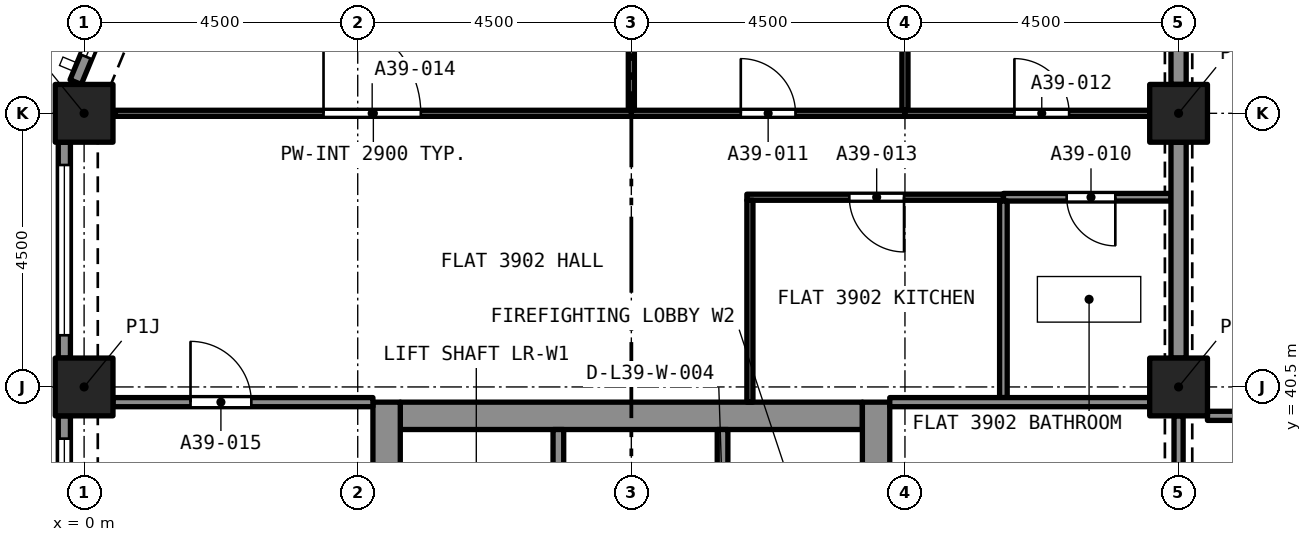
"""IFC4 building model, lengths in metres.
Left out: names, types, materials, properties, quantities, classifications, styles, units other than length and angle.
Written with IfcOpenShell. Run it as: python <this file> out.ifc"""

import sys

from ifc_helpers import new_model, si_unit, direction, frame, frame_2d, origin, origin_2d, place, context, subcontext, project, spatial, rectangle, extrude, element, fill, save


model = new_model("IFC4")
c1 = context("Model", 3, precision=1e-05, world=origin(), true_north=direction((0.0, 1.0)))
c2 = subcontext(c1, "Body", "Model", "MODEL_VIEW")
j1 = project(units=[si_unit("LENGTHUNIT", "METRE"), si_unit("PLANEANGLEUNIT", "RADIAN")], contexts=[c1])
p1 = place(None, origin())
s1 = spatial("IfcSite", under=j1, at=p1, CompositionType="ELEMENT")
p2 = place(p1, origin())
s2 = spatial("IfcBuilding", under=s1, at=p2, CompositionType="ELEMENT")
p3 = place(p2, frame((0.0, 0.0, 139.8)))
s3 = spatial("IfcBuildingStorey", under=s2, at=p3, CompositionType="ELEMENT", Elevation=139.8)
for number, where, z_axis, x_axis in (
    (1, (0.0, 40.5, 0.0), (0.0, 0.0, 1.0), (1.0, 0.0, 0.0)),
    (2, (18.0, 40.5, 0.0), (0.0, 0.0, 1.0), (1.0, 0.0, 0.0)),
    (3, (0.0, 45.0, 0.0), (0.0, 0.0, 1.0), (1.0, 0.0, 0.0)),
    (4, (18.0, 45.0, 0.0), (0.0, 0.0, 1.0), (1.0, 0.0, 0.0)),
):
    element("IfcColumn", number, at=place(p3, frame(where, z_axis=z_axis, x_axis=x_axis)), inside=s3, PredefinedType="COLUMN", context=c2, shape_type="SweptSolid", body=[
        extrude(rectangle(XDim=0.95, YDim=0.95, at=origin_2d()), origin(), (0.0, 0.0, 1.0), 3.2),
    ])
p4 = place(p3, frame((5.2, 40.025, 0.0), z_axis=(0.0, 0.0, 1.0), x_axis=(1.0, 0.0, 0.0)))
e5 = element("IfcWall", 5, at=p4, inside=s3, PredefinedType="SOLIDWALL", context=c2, shape_type="SweptSolid", body=[
    extrude(rectangle(XDim=7.6, YDim=0.45, at=frame_2d((3.8, 0.0))), origin(), (0.0, 0.0, 1.0), 3.2),
])
p5 = place(p3, frame((4.975, 27.25, 0.0), z_axis=(0.0, 0.0, 1.0), x_axis=(0.0, 1.0, 0.0)))
e6 = element("IfcWall", 6, at=p5, inside=s3, PredefinedType="SOLIDWALL", context=c2, shape_type="SweptSolid", body=[
    extrude(rectangle(XDim=13.0, YDim=0.45, at=frame_2d((6.5, 0.0))), origin(), (0.0, 0.0, 1.0), 3.2),
])
p6 = place(p5, frame((8.7, 0.0, 0.0)))
e7 = element("IfcOpeningElement", 7, at=p6, cuts=e6, PredefinedType="OPENING", context=c2, shape_type="SweptSolid", body=[
    extrude(rectangle(XDim=1.2, YDim=2.1, at=frame_2d((0.6, 1.05))), frame((0.0, 0.235, 0.0), z_axis=(0.0, -1.0, 0.0), x_axis=(1.0, 0.0, 0.0)), (0.0, 0.0, 1.0), 0.47),
])
p7 = place(p3, frame((13.025, 27.25, 0.0), z_axis=(0.0, 0.0, 1.0), x_axis=(0.0, 1.0, 0.0)))
e8 = element("IfcWall", 8, at=p7, inside=s3, PredefinedType="SOLIDWALL", context=c2, shape_type="SweptSolid", body=[
    extrude(rectangle(XDim=13.0, YDim=0.45, at=frame_2d((6.5, 0.0))), origin(), (0.0, 0.0, 1.0), 3.2),
])
p8 = place(p7, frame((10.85, 0.0, 0.0)))
e9 = element("IfcOpeningElement", 9, at=p8, cuts=e8, PredefinedType="OPENING", context=c2, shape_type="SweptSolid", body=[
    extrude(rectangle(XDim=1.1, YDim=2.1, at=frame_2d((0.55, 1.05))), frame((0.0, 0.235, 0.0), z_axis=(0.0, -1.0, 0.0), x_axis=(1.0, 0.0, 0.0)), (0.0, 0.0, 1.0), 0.47),
])
p9 = place(p7, frame((8.7, 0.0, 0.0)))
e10 = element("IfcOpeningElement", 10, at=p9, cuts=e8, PredefinedType="OPENING", context=c2, shape_type="SweptSolid", body=[
    extrude(rectangle(XDim=1.2, YDim=2.1, at=frame_2d((0.6, 1.05))), frame((0.0, 0.235, 0.0), z_axis=(0.0, -1.0, 0.0), x_axis=(1.0, 0.0, 0.0)), (0.0, 0.0, 1.0), 0.47),
])
p10 = place(p3, frame((-0.139, 45.513, 0.0), z_axis=(0.0, 0.0, 1.0), x_axis=(0.382680855588, 0.923880599843, 0.0)))
e11 = element("IfcWall", 11, at=p10, inside=s3, PredefinedType="SOLIDWALL", context=c2, shape_type="SweptSolid", body=[
    extrude(rectangle(XDim=2.403, YDim=0.2, at=frame_2d((1.201, 0.0))), origin(), (0.0, 0.0, 1.0), 3.2),
])
p11 = place(p10, frame((0.451, 0.0, 0.45)))
e12 = element("IfcOpeningElement", 12, at=p11, cuts=e11, PredefinedType="OPENING", context=c2, shape_type="SweptSolid", body=[
    extrude(rectangle(XDim=1.7, YDim=1.95, at=frame_2d((0.85, 0.975))), frame((0.0, 0.11, 0.0), z_axis=(0.0, -1.0, 0.0), x_axis=(1.0, 0.0, 0.0)), (0.0, 0.0, 1.0), 0.22),
])
p12 = place(p3, frame((-0.325, 40.975, 0.0), z_axis=(0.0, 0.0, 1.0), x_axis=(0.0, 1.0, 0.0)))
e13 = element("IfcWall", 13, at=p12, inside=s3, PredefinedType="SOLIDWALL", context=c2, shape_type="SweptSolid", body=[
    extrude(rectangle(XDim=3.55, YDim=0.2, at=frame_2d((1.775, 0.0))), origin(), (0.0, 0.0, 1.0), 3.2),
])
p13 = place(p12, frame((0.375, 0.0, 0.45)))
e14 = element("IfcOpeningElement", 14, at=p13, cuts=e13, PredefinedType="OPENING", context=c2, shape_type="SweptSolid", body=[
    extrude(rectangle(XDim=2.8, YDim=1.95, at=frame_2d((1.4, 0.975))), frame((0.0, 0.11, 0.0), z_axis=(0.0, -1.0, 0.0), x_axis=(1.0, 0.0, 0.0)), (0.0, 0.0, 1.0), 0.22),
])
p14 = place(p3, frame((-0.325, 36.475, 0.0), z_axis=(0.0, 0.0, 1.0), x_axis=(0.0, 1.0, 0.0)))
e15 = element("IfcWall", 15, at=p14, inside=s3, PredefinedType="SOLIDWALL", context=c2, shape_type="SweptSolid", body=[
    extrude(rectangle(XDim=3.55, YDim=0.2, at=frame_2d((1.775, 0.0))), origin(), (0.0, 0.0, 1.0), 3.2),
])
p15 = place(p14, frame((0.375, 0.0, 0.45)))
e16 = element("IfcOpeningElement", 16, at=p15, cuts=e15, PredefinedType="OPENING", context=c2, shape_type="SweptSolid", body=[
    extrude(rectangle(XDim=2.8, YDim=1.95, at=frame_2d((1.4, 0.975))), frame((0.0, 0.11, 0.0), z_axis=(0.0, -1.0, 0.0), x_axis=(1.0, 0.0, 0.0)), (0.0, 0.0, 1.0), 0.22),
])
p16 = place(p3, frame((17.875, 43.62, 0.0), z_axis=(0.0, 0.0, 1.0), x_axis=(-1.0, 0.0, 0.0)))
e17 = element("IfcWall", 17, at=p16, inside=s3, PredefinedType="PARTITIONING", context=c2, shape_type="SweptSolid", body=[
    extrude(rectangle(XDim=2.756, YDim=0.125, at=frame_2d((1.378, 0.0))), origin(), (0.0, 0.0, 1.0), 2.9),
])
p17 = place(p16, frame((0.915, 0.0, 0.0)))
e18 = element("IfcOpeningElement", 18, at=p17, cuts=e17, PredefinedType="OPENING", context=c2, shape_type="SweptSolid", body=[
    extrude(rectangle(XDim=0.8, YDim=2.1, at=frame_2d((0.4, 1.05))), frame((0.0, 0.073, 0.0), z_axis=(0.0, -1.0, 0.0), x_axis=(1.0, 0.0, 0.0)), (0.0, 0.0, 1.0), 0.145),
])
p18 = place(p3, frame((15.119, 40.325, 0.0), z_axis=(0.0, 0.0, 1.0), x_axis=(0.0, 1.0, 0.0)))
e19 = element("IfcWall", 19, at=p18, inside=s3, PredefinedType="PARTITIONING", context=c2, shape_type="SweptSolid", body=[
    extrude(rectangle(XDim=3.233, YDim=0.125, at=frame_2d((1.616, 0.0))), origin(), (0.0, 0.0, 1.0), 2.9),
])
p19 = place(p3, frame((18.0, 40.975, 0.0), z_axis=(0.0, 0.0, 1.0), x_axis=(0.0, 1.0, 0.0)))
e20 = element("IfcWall", 20, at=p19, inside=s3, PredefinedType="PARTITIONING", context=c2, shape_type="SweptSolid", body=[
    extrude(rectangle(XDim=3.55, YDim=0.25, at=frame_2d((1.775, 0.0))), origin(), (0.0, 0.0, 1.0), 2.38),
])
p20 = place(p3, frame((13.5, 45.05, 0.0), z_axis=(0.0, 0.0, 1.0), x_axis=(0.0, 1.0, 0.0)))
e21 = element("IfcWall", 21, at=p20, inside=s3, PredefinedType="PARTITIONING", context=c2, shape_type="SweptSolid", body=[
    extrude(rectangle(XDim=3.975, YDim=0.1, at=frame_2d((1.987, 0.0))), origin(), (0.0, 0.0, 1.0), 2.9),
])
p21 = place(p3, frame((9.0, 45.0, 0.0), z_axis=(0.0, 0.0, 1.0), x_axis=(1.0, 0.0, 0.0)))
e22 = element("IfcWall", 22, at=p21, inside=s3, PredefinedType="PARTITIONING", context=c2, shape_type="SweptSolid", body=[
    extrude(rectangle(XDim=4.5, YDim=0.1, at=frame_2d((2.25, 0.0))), origin(), (0.0, 0.0, 1.0), 2.9),
])
p22 = place(p21, frame((1.8, 0.0, 0.0)))
e23 = element("IfcOpeningElement", 23, at=p22, cuts=e22, PredefinedType="OPENING", context=c2, shape_type="SweptSolid", body=[
    extrude(rectangle(XDim=0.9, YDim=2.1, at=frame_2d((0.45, 1.05))), frame((0.0, 0.06, 0.0), z_axis=(0.0, -1.0, 0.0), x_axis=(1.0, 0.0, 0.0)), (0.0, 0.0, 1.0), 0.12),
])
p23 = place(p3, frame((9.0, 45.05, 0.0), z_axis=(0.0, 0.0, 1.0), x_axis=(0.0, 1.0, 0.0)))
e24 = element("IfcWall", 24, at=p23, inside=s3, PredefinedType="PARTITIONING", context=c2, shape_type="SweptSolid", body=[
    extrude(rectangle(XDim=3.975, YDim=0.1, at=frame_2d((1.987, 0.0))), origin(), (0.0, 0.0, 1.0), 2.9),
])
p24 = place(p3, frame((13.5, 45.0, 0.0), z_axis=(0.0, 0.0, 1.0), x_axis=(1.0, 0.0, 0.0)))
e25 = element("IfcWall", 25, at=p24, inside=s3, PredefinedType="PARTITIONING", context=c2, shape_type="SweptSolid", body=[
    extrude(rectangle(XDim=4.025, YDim=0.1, at=frame_2d((2.012, 0.0))), origin(), (0.0, 0.0, 1.0), 2.9),
])
p25 = place(p24, frame((1.8, 0.0, 0.0)))
e26 = element("IfcOpeningElement", 26, at=p25, cuts=e25, PredefinedType="OPENING", context=c2, shape_type="SweptSolid", body=[
    extrude(rectangle(XDim=0.9, YDim=2.1, at=frame_2d((0.45, 1.05))), frame((0.0, 0.06, 0.0), z_axis=(0.0, -1.0, 0.0), x_axis=(1.0, 0.0, 0.0)), (0.0, 0.0, 1.0), 0.12),
])
p26 = place(p3, frame((18.0, 45.475, 0.0), z_axis=(0.0, 0.0, 1.0), x_axis=(0.0, 1.0, 0.0)))
e27 = element("IfcWall", 27, at=p26, inside=s3, PredefinedType="PARTITIONING", context=c2, shape_type="SweptSolid", body=[
    extrude(rectangle(XDim=3.55, YDim=0.25, at=frame_2d((1.775, 0.0))), origin(), (0.0, 0.0, 1.0), 2.38),
])
p27 = place(p3, frame((15.119, 43.62, 0.0), z_axis=(0.0, 0.0, 1.0), x_axis=(-1.0, 0.0, 0.0)))
e28 = element("IfcWall", 28, at=p27, inside=s3, PredefinedType="PARTITIONING", context=c2, shape_type="SweptSolid", body=[
    extrude(rectangle(XDim=4.219, YDim=0.1, at=frame_2d((2.11, 0.0))), origin(), (0.0, 0.0, 1.0), 2.9),
])
p28 = place(p27, frame((1.635, 0.0, 0.0)))
e29 = element("IfcOpeningElement", 29, at=p28, cuts=e28, PredefinedType="OPENING", context=c2, shape_type="SweptSolid", body=[
    extrude(rectangle(XDim=0.9, YDim=2.1, at=frame_2d((0.45, 1.05))), frame((0.0, 0.06, 0.0), z_axis=(0.0, -1.0, 0.0), x_axis=(1.0, 0.0, 0.0)), (0.0, 0.0, 1.0), 0.12),
])
p29 = place(p3, frame((10.95, 40.25, 0.0), z_axis=(0.0, 0.0, 1.0), x_axis=(0.0, 1.0, 0.0)))
e30 = element("IfcWall", 30, at=p29, inside=s3, PredefinedType="PARTITIONING", context=c2, shape_type="SweptSolid", body=[
    extrude(rectangle(XDim=3.32, YDim=0.1, at=frame_2d((1.66, 0.0))), origin(), (0.0, 0.0, 1.0), 2.9),
])
p30 = place(p3, frame((0.514, 45.0, 0.0), z_axis=(0.0, 0.0, 1.0), x_axis=(1.0, 0.0, 0.0)))
e31 = element("IfcWall", 31, at=p30, inside=s3, PredefinedType="PARTITIONING", context=c2, shape_type="SweptSolid", body=[
    extrude(rectangle(XDim=8.486, YDim=0.1, at=frame_2d((4.243, 0.0))), origin(), (0.0, 0.0, 1.0), 2.9),
])
p31 = place(p30, frame((3.423, 0.0, 0.0)))
e32 = element("IfcOpeningElement", 32, at=p31, cuts=e31, PredefinedType="OPENING", context=c2, shape_type="SweptSolid", body=[
    extrude(rectangle(XDim=1.6, YDim=2.1, at=frame_2d((0.8, 1.05))), frame((0.0, 0.06, 0.0), z_axis=(0.0, -1.0, 0.0), x_axis=(1.0, 0.0, 0.0)), (0.0, 0.0, 1.0), 0.12),
])
p32 = place(p3, frame((0.475, 40.25, 0.0), z_axis=(0.0, 0.0, 1.0), x_axis=(1.0, 0.0, 0.0)))
e33 = element("IfcWall", 33, at=p32, inside=s3, PredefinedType="PARTITIONING", context=c2, shape_type="SweptSolid", body=[
    extrude(rectangle(XDim=4.275, YDim=0.15, at=frame_2d((2.137, 0.0))), origin(), (0.0, 0.0, 1.0), 2.9),
])
p33 = place(p32, frame((1.275, 0.0, 0.0)))
e34 = element("IfcOpeningElement", 34, at=p33, cuts=e33, PredefinedType="OPENING", context=c2, shape_type="SweptSolid", body=[
    extrude(rectangle(XDim=1.0, YDim=2.1, at=frame_2d((0.5, 1.05))), frame((0.0, 0.085, 0.0), z_axis=(0.0, -1.0, 0.0), x_axis=(1.0, 0.0, 0.0)), (0.0, 0.0, 1.0), 0.17),
])
p34 = place(p3, frame((13.25, 40.25, 0.0), z_axis=(0.0, 0.0, 1.0), x_axis=(1.0, 0.0, 0.0)))
e35 = element("IfcWall", 35, at=p34, inside=s3, PredefinedType="PARTITIONING", context=c2, shape_type="SweptSolid", body=[
    extrude(rectangle(XDim=4.275, YDim=0.15, at=frame_2d((2.137, 0.0))), origin(), (0.0, 0.0, 1.0), 2.9),
])
p35 = place(p3, frame((18.475, 40.025, 0.0), z_axis=(0.0, 0.0, 1.0), x_axis=(1.0, 0.0, 0.0)))
e36 = element("IfcWall", 36, at=p35, inside=s3, PredefinedType="PARTITIONING", context=c2, shape_type="SweptSolid", body=[
    extrude(rectangle(XDim=12.55, YDim=0.15, at=frame_2d((6.275, 0.0))), origin(), (0.0, 0.0, 1.0), 2.75),
])
p36 = place(p35, frame((5.775, 0.0, 0.0)))
e37 = element("IfcOpeningElement", 37, at=p36, cuts=e36, PredefinedType="OPENING", context=c2, shape_type="SweptSolid", body=[
    extrude(rectangle(XDim=1.0, YDim=2.1, at=frame_2d((0.5, 1.05))), frame((0.0, 0.085, 0.0), z_axis=(0.0, -1.0, 0.0), x_axis=(1.0, 0.0, 0.0)), (0.0, 0.0, 1.0), 0.17),
])
p37 = place(p3, frame((18.0, 40.025, 0.0), z_axis=(0.0, 0.0, 1.0), x_axis=(0.0, -1.0, 0.0)))
e38 = element("IfcWall", 38, at=p37, inside=s3, PredefinedType="PARTITIONING", context=c2, shape_type="SweptSolid", body=[
    extrude(rectangle(XDim=3.55, YDim=0.15, at=frame_2d((1.775, 0.0))), origin(), (0.0, 0.0, 1.0), 2.38),
])
p38 = place(p37, frame((1.175, 0.0, 0.0)))
e39 = element("IfcOpeningElement", 39, at=p38, cuts=e38, PredefinedType="OPENING", context=c2, shape_type="SweptSolid", body=[
    extrude(rectangle(XDim=1.2, YDim=2.1, at=frame_2d((0.6, 1.05))), frame((0.0, 0.085, 0.0), z_axis=(0.0, -1.0, 0.0), x_axis=(1.0, 0.0, 0.0)), (0.0, 0.0, 1.0), 0.17),
])
p39 = place(p3, frame((7.8, 37.5, 0.0), z_axis=(0.0, 0.0, 1.0), x_axis=(0.0, 1.0, 0.0)))
e40 = element("IfcWall", 40, at=p39, inside=s3, PredefinedType="SOLIDWALL", context=c2, shape_type="SweptSolid", body=[
    extrude(rectangle(XDim=2.3, YDim=0.175, at=frame_2d((1.15, 0.0))), origin(), (0.0, 0.0, 1.0), 2.9),
])
p40 = place(p3, frame((10.5, 37.5, 0.0), z_axis=(0.0, 0.0, 1.0), x_axis=(0.0, 1.0, 0.0)))
e41 = element("IfcWall", 41, at=p40, inside=s3, PredefinedType="SOLIDWALL", context=c2, shape_type="SweptSolid", body=[
    extrude(rectangle(XDim=2.3, YDim=0.175, at=frame_2d((1.15, 0.0))), origin(), (0.0, 0.0, 1.0), 2.9),
])
p41 = place(p40, frame((0.65, 0.0, 0.0)))
e42 = element("IfcOpeningElement", 42, at=p41, cuts=e41, PredefinedType="OPENING", context=c2, shape_type="SweptSolid", body=[
    extrude(rectangle(XDim=1.0, YDim=2.1, at=frame_2d((0.5, 1.05))), frame((0.0, 0.097, 0.0), z_axis=(0.0, -1.0, 0.0), x_axis=(1.0, 0.0, 0.0)), (0.0, 0.0, 1.0), 0.195),
])
p42 = place(p11, origin())
e43 = element("IfcWindow", 43, at=p42, inside=s3, PartitioningType="SINGLE_PANEL", PredefinedType="WINDOW", context=c2, shape_type="SweptSolid", body=[
    extrude(rectangle(XDim=1.7, YDim=1.95, at=frame_2d((0.85, 0.975))), frame((0.0, 0.03, 0.0), z_axis=(0.0, -1.0, 0.0), x_axis=(1.0, 0.0, 0.0)), (0.0, 0.0, 1.0), 0.06),
])
fill(e12, e43)
p43 = place(p13, origin())
e44 = element("IfcWindow", 44, at=p43, inside=s3, PartitioningType="SINGLE_PANEL", PredefinedType="WINDOW", context=c2, shape_type="SweptSolid", body=[
    extrude(rectangle(XDim=2.8, YDim=1.95, at=frame_2d((1.4, 0.975))), frame((0.0, 0.03, 0.0), z_axis=(0.0, -1.0, 0.0), x_axis=(1.0, 0.0, 0.0)), (0.0, 0.0, 1.0), 0.06),
])
fill(e14, e44)
p44 = place(p15, origin())
e45 = element("IfcWindow", 45, at=p44, inside=s3, PartitioningType="SINGLE_PANEL", PredefinedType="WINDOW", context=c2, shape_type="SweptSolid", body=[
    extrude(rectangle(XDim=2.8, YDim=1.95, at=frame_2d((1.4, 0.975))), frame((0.0, 0.03, 0.0), z_axis=(0.0, -1.0, 0.0), x_axis=(1.0, 0.0, 0.0)), (0.0, 0.0, 1.0), 0.06),
])
fill(e16, e45)
p45 = place(p17, origin())
e46 = element("IfcDoor", 46, at=p45, inside=s3, OperationType="SINGLE_SWING_LEFT", PredefinedType="DOOR", context=c2, shape_type="SweptSolid", body=[
    extrude(rectangle(XDim=0.8, YDim=2.1, at=frame_2d((0.4, 1.05))), frame((0.0, 0.025, 0.0), z_axis=(0.0, -1.0, 0.0), x_axis=(1.0, 0.0, 0.0)), (0.0, 0.0, 1.0), 0.05),
])
fill(e18, e46)
p46 = place(p22, origin())
e47 = element("IfcDoor", 47, at=p46, inside=s3, OperationType="SINGLE_SWING_LEFT", PredefinedType="DOOR", context=c2, shape_type="SweptSolid", body=[
    extrude(rectangle(XDim=0.9, YDim=2.1, at=frame_2d((0.45, 1.05))), frame((0.0, 0.025, 0.0), z_axis=(0.0, -1.0, 0.0), x_axis=(1.0, 0.0, 0.0)), (0.0, 0.0, 1.0), 0.05),
])
fill(e23, e47)
p47 = place(p25, origin())
e48 = element("IfcDoor", 48, at=p47, inside=s3, OperationType="SINGLE_SWING_RIGHT", PredefinedType="DOOR", context=c2, shape_type="SweptSolid", body=[
    extrude(rectangle(XDim=0.9, YDim=2.1, at=frame_2d((0.45, 1.05))), frame((0.0, 0.025, 0.0), z_axis=(0.0, -1.0, 0.0), x_axis=(1.0, 0.0, 0.0)), (0.0, 0.0, 1.0), 0.05),
])
fill(e26, e48)
p48 = place(p28, origin())
e49 = element("IfcDoor", 49, at=p48, inside=s3, OperationType="SINGLE_SWING_LEFT", PredefinedType="DOOR", context=c2, shape_type="SweptSolid", body=[
    extrude(rectangle(XDim=0.9, YDim=2.1, at=frame_2d((0.45, 1.05))), frame((0.0, 0.025, 0.0), z_axis=(0.0, -1.0, 0.0), x_axis=(1.0, 0.0, 0.0)), (0.0, 0.0, 1.0), 0.05),
])
fill(e29, e49)
p49 = place(p31, origin())
e50 = element("IfcDoor", 50, at=p49, inside=s3, OperationType="SINGLE_SWING_LEFT", PredefinedType="DOOR", context=c2, shape_type="SweptSolid", body=[
    extrude(rectangle(XDim=1.6, YDim=2.1, at=frame_2d((0.8, 1.05))), frame((0.0, 0.025, 0.0), z_axis=(0.0, -1.0, 0.0), x_axis=(1.0, 0.0, 0.0)), (0.0, 0.0, 1.0), 0.05),
])
fill(e32, e50)
p50 = place(p33, origin())
e51 = element("IfcDoor", 51, at=p50, inside=s3, OperationType="SINGLE_SWING_LEFT", PredefinedType="DOOR", context=c2, shape_type="SweptSolid", body=[
    extrude(rectangle(XDim=1.0, YDim=2.1, at=frame_2d((0.5, 1.05))), frame((0.0, 0.025, 0.0), z_axis=(0.0, -1.0, 0.0), x_axis=(1.0, 0.0, 0.0)), (0.0, 0.0, 1.0), 0.05),
])
fill(e34, e51)
save(model, sys.argv[1])
